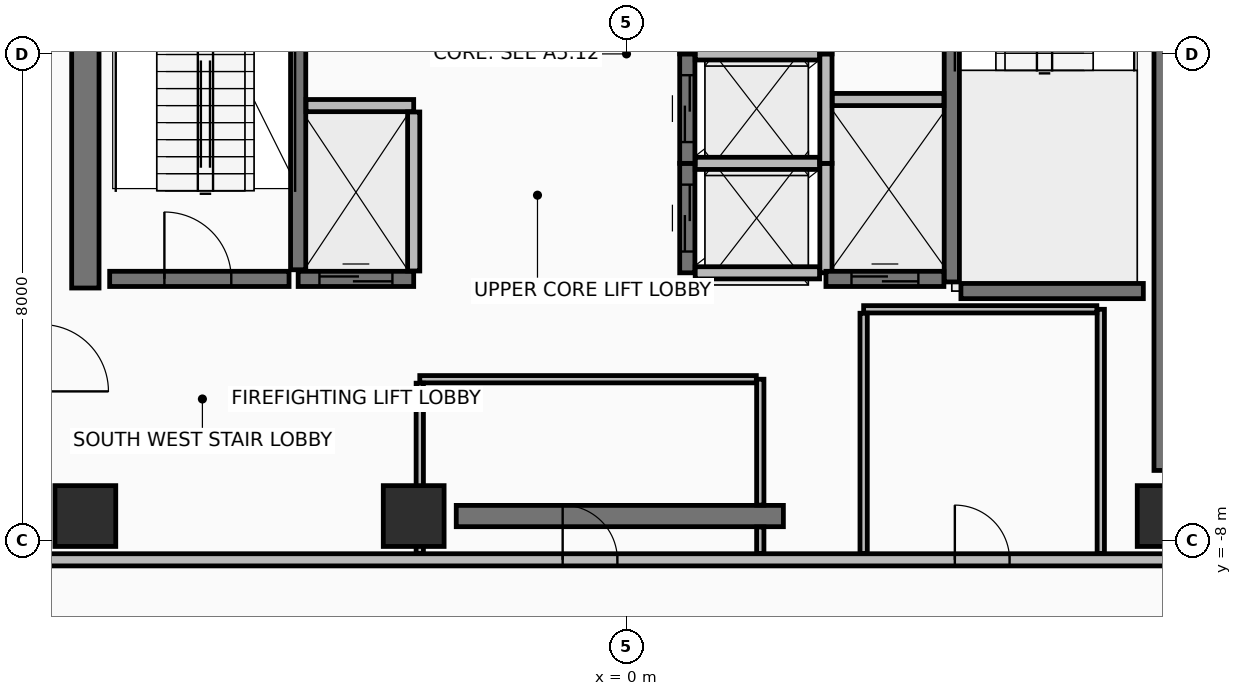
"""IFC4 building model, lengths in metres.
Left out: names, types, materials, properties, quantities, classifications, styles, units other than length and angle.
Written with IfcOpenShell. Run it as: python <this file> out.ifc"""

import sys

from ifc_helpers import new_model, si_unit, direction, frame, frame_2d, origin, origin_2d, place, context, subcontext, project, spatial, rectangle, extrude, element, fill, save


model = new_model("IFC4")
c1 = context("Model", 3, precision=1e-05, world=origin(), true_north=direction((0.0, 1.0)))
c2 = subcontext(c1, "Body", "Model", "MODEL_VIEW")
j1 = project(units=[si_unit("LENGTHUNIT", "METRE"), si_unit("PLANEANGLEUNIT", "RADIAN")], contexts=[c1])
p1 = place(None, origin())
s1 = spatial("IfcSite", under=j1, at=p1, CompositionType="ELEMENT")
p2 = place(p1, origin())
s2 = spatial("IfcBuilding", under=s1, at=p2, CompositionType="ELEMENT")
p3 = place(p2, frame((0.0, 0.0, 245.05)))
s3 = spatial("IfcBuildingStorey", under=s2, at=p3, CompositionType="ELEMENT", Elevation=245.05)
for number, where, z_axis, x_axis in (
    (1, (-8.9, -7.6, 0.0), (0.0, 0.0, 1.0), (1.0, 0.0, 0.0)),
    (2, (-3.5, -7.6, 0.0), (0.0, 0.0, 1.0), (1.0, 0.0, 0.0)),
    (3, (8.9, -7.6, 0.0), (0.0, 0.0, 1.0), (1.0, 0.0, 0.0)),
):
    element("IfcColumn", number, at=place(p3, frame(where, z_axis=z_axis, x_axis=x_axis)), inside=s3, PredefinedType="COLUMN", context=c2, shape_type="SweptSolid", body=[
        extrude(rectangle(XDim=1.0, YDim=1.0, at=origin_2d()), origin(), (0.0, 0.0, 1.0), 3.6),
    ])
p4 = place(p3, frame((-2.8, -7.6, 0.0), z_axis=(0.0, 0.0, 1.0), x_axis=(1.0, 0.0, 0.0)))
e4 = element("IfcWall", 4, at=p4, inside=s3, PredefinedType="SHEAR", context=c2, shape_type="SweptSolid", body=[
    extrude(rectangle(XDim=5.38, YDim=0.35, at=frame_2d((2.69, 0.0))), origin(), (0.0, 0.0, 1.0), 3.42),
])
for number, where, z_axis, x_axis in (
    (5, (-8.9, -3.85, 0.0), (0.0, 0.0, 1.0), (0.0, 1.0, 0.0)),
    (6, (8.9, -6.85, 0.0), (0.0, 0.0, 1.0), (0.0, 1.0, 0.0)),
):
    element("IfcWall", number, at=place(p3, frame(where, z_axis=z_axis, x_axis=x_axis)), inside=s3, PredefinedType="SHEAR", context=c2, shape_type="SweptSolid", body=[
        extrude(rectangle(XDim=10.7, YDim=0.45, at=frame_2d((5.35, 0.0))), origin(), (0.0, 0.0, 1.0), 3.42),
    ])
p5 = place(p3, frame((-9.62, -8.32, 0.0), z_axis=(0.0, 0.0, 1.0), x_axis=(1.0, 0.0, 0.0)))
e7 = element("IfcWall", 7, at=p5, inside=s3, PredefinedType="PARTITIONING", context=c2, shape_type="SweptSolid", body=[
    extrude(rectangle(XDim=19.24, YDim=0.2, at=frame_2d((9.62, 0.0))), origin(), (0.0, 0.0, 1.0), 2.915),
])
p6 = place(p5, frame((8.57, 0.0, 0.0)))
e8 = element("IfcOpeningElement", 8, at=p6, cuts=e7, PredefinedType="OPENING", context=c2, shape_type="SweptSolid", body=[
    extrude(rectangle(XDim=0.9, YDim=2.1, at=frame_2d((0.45, 1.05))), frame((0.0, 0.11, 0.0), z_axis=(0.0, -1.0, 0.0), x_axis=(1.0, 0.0, 0.0)), (0.0, 0.0, 1.0), 0.22),
])
p7 = place(p5, frame((15.02, 0.0, 0.0)))
e9 = element("IfcOpeningElement", 9, at=p7, cuts=e7, PredefinedType="OPENING", context=c2, shape_type="SweptSolid", body=[
    extrude(rectangle(XDim=0.9, YDim=2.1, at=frame_2d((0.45, 1.05))), frame((0.0, 0.11, 0.0), z_axis=(0.0, -1.0, 0.0), x_axis=(1.0, 0.0, 0.0)), (0.0, 0.0, 1.0), 0.22),
])
p8 = place(p3, frame((-5.4, -3.55, 0.0), z_axis=(0.0, 0.0, 1.0), x_axis=(0.0, 1.0, 0.0)))
e10 = element("IfcWall", 10, at=p8, inside=s3, PredefinedType="SHEAR", context=c2, shape_type="SweptSolid", body=[
    extrude(rectangle(XDim=7.3, YDim=0.25, at=frame_2d((3.65, 0.0))), origin(), (0.0, 0.0, 1.0), 3.42),
])
p9 = place(p3, frame((-8.5, -3.7, 0.0), z_axis=(0.0, 0.0, 1.0), x_axis=(1.0, 0.0, 0.0)))
e11 = element("IfcWall", 11, at=p9, inside=s3, PredefinedType="SHEAR", context=c2, shape_type="SweptSolid", body=[
    extrude(rectangle(XDim=2.95, YDim=0.25, at=frame_2d((1.475, 0.0))), origin(), (0.0, 0.0, 1.0), 3.42),
])
p10 = place(p9, frame((0.9, 0.0, 0.0)))
e12 = element("IfcOpeningElement", 12, at=p10, cuts=e11, PredefinedType="OPENING", context=c2, shape_type="SweptSolid", body=[
    extrude(rectangle(XDim=1.1, YDim=2.15, at=frame_2d((0.55, 1.075))), frame((0.0, 0.135, 0.0), z_axis=(0.0, -1.0, 0.0), x_axis=(1.0, 0.0, 0.0)), (0.0, 0.0, 1.0), 0.27),
])
p11 = place(p3, frame((5.35, -3.75, 0.0), z_axis=(0.0, 0.0, 1.0), x_axis=(0.0, 1.0, 0.0)))
e13 = element("IfcWall", 13, at=p11, inside=s3, PredefinedType="SHEAR", context=c2, shape_type="SweptSolid", body=[
    extrude(rectangle(XDim=7.3, YDim=0.25, at=frame_2d((3.65, 0.0))), origin(), (0.0, 0.0, 1.0), 3.42),
])
p12 = place(p3, frame((5.5, -3.9, 0.0), z_axis=(0.0, 0.0, 1.0), x_axis=(1.0, 0.0, 0.0)))
e14 = element("IfcWall", 14, at=p12, inside=s3, PredefinedType="SHEAR", context=c2, shape_type="SweptSolid", body=[
    extrude(rectangle(XDim=3.0, YDim=0.25, at=frame_2d((1.5, 0.0))), origin(), (0.0, 0.0, 1.0), 3.42),
])
p13 = place(p3, frame((1.0, -3.6, 0.0), z_axis=(0.0, 0.0, 1.0), x_axis=(0.0, 1.0, 0.0)))
e15 = element("IfcWall", 15, at=p13, inside=s3, PredefinedType="SHEAR", context=c2, shape_type="SweptSolid", body=[
    extrude(rectangle(XDim=1.8, YDim=0.25, at=frame_2d((0.9, 0.0))), origin(), (0.0, 0.0, 1.0), 3.42),
])
p14 = place(p13, frame((0.35, 0.0, 0.0)))
e16 = element("IfcOpeningElement", 16, at=p14, cuts=e15, PredefinedType="OPENING", context=c2, shape_type="SweptSolid", body=[
    extrude(rectangle(XDim=1.1, YDim=2.2, at=frame_2d((0.55, 1.1))), frame((0.0, 0.135, 0.0), z_axis=(0.0, -1.0, 0.0), x_axis=(1.0, 0.0, 0.0)), (0.0, 0.0, 1.0), 0.27),
])
p15 = place(p3, frame((3.28, -3.6, 0.0), z_axis=(0.0, 0.0, 1.0), x_axis=(0.0, 1.0, 0.0)))
e17 = element("IfcWall", 17, at=p15, inside=s3, PredefinedType="PARTITIONING", context=c2, shape_type="SweptSolid", body=[
    extrude(rectangle(XDim=1.8, YDim=0.2, at=frame_2d((0.9, 0.0))), origin(), (0.0, 0.0, 1.0), 3.42),
])
for number, where, z_axis, x_axis in (
    (18, (1.13, -3.6, 0.0), (0.0, 0.0, 1.0), (1.0, 0.0, 0.0)),
    (19, (1.13, -1.8, 0.0), (0.0, 0.0, 1.0), (1.0, 0.0, 0.0)),
):
    element("IfcWall", number, at=place(p3, frame(where, z_axis=z_axis, x_axis=x_axis)), inside=s3, PredefinedType="PARTITIONING", context=c2, shape_type="SweptSolid", body=[
        extrude(rectangle(XDim=2.045, YDim=0.2, at=frame_2d((1.022, 0.0))), origin(), (0.0, 0.0, 1.0), 3.42),
    ])
p16 = place(p3, frame((1.0, -1.8, 0.0), z_axis=(0.0, 0.0, 1.0), x_axis=(0.0, 1.0, 0.0)))
e20 = element("IfcWall", 20, at=p16, inside=s3, PredefinedType="SHEAR", context=c2, shape_type="SweptSolid", body=[
    extrude(rectangle(XDim=1.8, YDim=0.25, at=frame_2d((0.9, 0.0))), origin(), (0.0, 0.0, 1.0), 3.42),
])
p17 = place(p16, frame((0.35, 0.0, 0.0)))
e21 = element("IfcOpeningElement", 21, at=p17, cuts=e20, PredefinedType="OPENING", context=c2, shape_type="SweptSolid", body=[
    extrude(rectangle(XDim=1.1, YDim=2.2, at=frame_2d((0.55, 1.1))), frame((0.0, 0.135, 0.0), z_axis=(0.0, -1.0, 0.0), x_axis=(1.0, 0.0, 0.0)), (0.0, 0.0, 1.0), 0.27),
])
p18 = place(p3, frame((3.28, -1.8, 0.0), z_axis=(0.0, 0.0, 1.0), x_axis=(0.0, 1.0, 0.0)))
e22 = element("IfcWall", 22, at=p18, inside=s3, PredefinedType="PARTITIONING", context=c2, shape_type="SweptSolid", body=[
    extrude(rectangle(XDim=1.8, YDim=0.2, at=frame_2d((0.9, 0.0))), origin(), (0.0, 0.0, 1.0), 3.42),
])
p19 = place(p3, frame((1.13, 0.0, 0.0), z_axis=(0.0, 0.0, 1.0), x_axis=(1.0, 0.0, 0.0)))
e23 = element("IfcWall", 23, at=p19, inside=s3, PredefinedType="PARTITIONING", context=c2, shape_type="SweptSolid", body=[
    extrude(rectangle(XDim=2.045, YDim=0.2, at=frame_2d((1.022, 0.0))), origin(), (0.0, 0.0, 1.0), 3.42),
])
p20 = place(p3, frame((1.0, 0.0, 0.0), z_axis=(0.0, 0.0, 1.0), x_axis=(0.0, 1.0, 0.0)))
e24 = element("IfcWall", 24, at=p20, inside=s3, PredefinedType="SHEAR", context=c2, shape_type="SweptSolid", body=[
    extrude(rectangle(XDim=1.8, YDim=0.25, at=frame_2d((0.9, 0.0))), origin(), (0.0, 0.0, 1.0), 3.42),
])
p21 = place(p20, frame((0.35, 0.0, 0.0)))
e25 = element("IfcOpeningElement", 25, at=p21, cuts=e24, PredefinedType="OPENING", context=c2, shape_type="SweptSolid", body=[
    extrude(rectangle(XDim=1.1, YDim=2.2, at=frame_2d((0.55, 1.1))), frame((0.0, 0.135, 0.0), z_axis=(0.0, -1.0, 0.0), x_axis=(1.0, 0.0, 0.0)), (0.0, 0.0, 1.0), 0.27),
])
p22 = place(p3, frame((3.28, 0.0, 0.0), z_axis=(0.0, 0.0, 1.0), x_axis=(0.0, 1.0, 0.0)))
e26 = element("IfcWall", 26, at=p22, inside=s3, PredefinedType="PARTITIONING", context=c2, shape_type="SweptSolid", body=[
    extrude(rectangle(XDim=1.8, YDim=0.2, at=frame_2d((0.9, 0.0))), origin(), (0.0, 0.0, 1.0), 3.42),
])
p23 = place(p3, frame((-5.4, -3.7, 0.0), z_axis=(0.0, 0.0, 1.0), x_axis=(1.0, 0.0, 0.0)))
e27 = element("IfcWall", 27, at=p23, inside=s3, PredefinedType="SHEAR", context=c2, shape_type="SweptSolid", body=[
    extrude(rectangle(XDim=1.9, YDim=0.25, at=frame_2d((0.95, 0.0))), origin(), (0.0, 0.0, 1.0), 3.42),
])
p24 = place(p23, frame((0.35, 0.0, 0.0)))
e28 = element("IfcOpeningElement", 28, at=p24, cuts=e27, PredefinedType="OPENING", context=c2, shape_type="SweptSolid", body=[
    extrude(rectangle(XDim=1.2, YDim=2.2, at=frame_2d((0.6, 1.1))), frame((0.0, 0.135, 0.0), z_axis=(0.0, -1.0, 0.0), x_axis=(1.0, 0.0, 0.0)), (0.0, 0.0, 1.0), 0.27),
])
p25 = place(p3, frame((-5.27, -0.85, 0.0), z_axis=(0.0, 0.0, 1.0), x_axis=(1.0, 0.0, 0.0)))
e29 = element("IfcWall", 29, at=p25, inside=s3, PredefinedType="PARTITIONING", context=c2, shape_type="SweptSolid", body=[
    extrude(rectangle(XDim=1.77, YDim=0.2, at=frame_2d((0.885, 0.0))), origin(), (0.0, 0.0, 1.0), 3.42),
])
p26 = place(p3, frame((-3.5, -3.57, 0.0), z_axis=(0.0, 0.0, 1.0), x_axis=(0.0, 1.0, 0.0)))
e30 = element("IfcWall", 30, at=p26, inside=s3, PredefinedType="PARTITIONING", context=c2, shape_type="SweptSolid", body=[
    extrude(rectangle(XDim=2.615, YDim=0.2, at=frame_2d((1.308, 0.0))), origin(), (0.0, 0.0, 1.0), 3.42),
])
p27 = place(p3, frame((3.28, -3.7, 0.0), z_axis=(0.0, 0.0, 1.0), x_axis=(1.0, 0.0, 0.0)))
e31 = element("IfcWall", 31, at=p27, inside=s3, PredefinedType="SHEAR", context=c2, shape_type="SweptSolid", body=[
    extrude(rectangle(XDim=1.94, YDim=0.25, at=frame_2d((0.97, 0.0))), origin(), (0.0, 0.0, 1.0), 3.42),
])
p28 = place(p27, frame((0.42, 0.0, 0.0)))
e32 = element("IfcOpeningElement", 32, at=p28, cuts=e31, PredefinedType="OPENING", context=c2, shape_type="SweptSolid", body=[
    extrude(rectangle(XDim=1.1, YDim=2.2, at=frame_2d((0.55, 1.1))), frame((0.0, 0.135, 0.0), z_axis=(0.0, -1.0, 0.0), x_axis=(1.0, 0.0, 0.0)), (0.0, 0.0, 1.0), 0.27),
])
p29 = place(p3, frame((3.385, -0.75, 0.0), z_axis=(0.0, 0.0, 1.0), x_axis=(1.0, 0.0, 0.0)))
e33 = element("IfcWall", 33, at=p29, inside=s3, PredefinedType="PARTITIONING", context=c2, shape_type="SweptSolid", body=[
    extrude(rectangle(XDim=1.835, YDim=0.2, at=frame_2d((0.917, 0.0))), origin(), (0.0, 0.0, 1.0), 3.42),
])
p30 = place(p3, frame((2.2, -8.215, 0.0), z_axis=(0.0, 0.0, 1.0), x_axis=(0.0, 1.0, 0.0)))
e34 = element("IfcWall", 34, at=p30, inside=s3, PredefinedType="PARTITIONING", context=c2, shape_type="SweptSolid", body=[
    extrude(rectangle(XDim=0.435, YDim=0.12, at=frame_2d((0.218, 0.0))), origin(), (0.0, 0.0, 1.0), 2.715),
])
p31 = place(p3, frame((2.2, -7.42, 0.0), z_axis=(0.0, 0.0, 1.0), x_axis=(0.0, 1.0, 0.0)))
e35 = element("IfcWall", 35, at=p31, inside=s3, PredefinedType="PARTITIONING", context=c2, shape_type="SweptSolid", body=[
    extrude(rectangle(XDim=2.07, YDim=0.12, at=frame_2d((1.035, 0.0))), origin(), (0.0, 0.0, 1.0), 2.715),
])
p32 = place(p3, frame((2.135, -5.35, 0.0), z_axis=(0.0, 0.0, 1.0), x_axis=(-1.0, 0.0, 0.0)))
e36 = element("IfcWall", 36, at=p32, inside=s3, PredefinedType="PARTITIONING", context=c2, shape_type="SweptSolid", body=[
    extrude(rectangle(XDim=5.535, YDim=0.12, at=frame_2d((2.768, 0.0))), origin(), (0.0, 0.0, 1.0), 2.715),
])
p33 = place(p3, frame((-3.4, -5.415, 0.0), z_axis=(0.0, 0.0, 1.0), x_axis=(0.0, -1.0, 0.0)))
e37 = element("IfcWall", 37, at=p33, inside=s3, PredefinedType="PARTITIONING", context=c2, shape_type="SweptSolid", body=[
    extrude(rectangle(XDim=2.8, YDim=0.12, at=frame_2d((1.4, 0.0))), origin(), (0.0, 0.0, 1.0), 2.715),
])
p34 = place(p3, frame((7.8, -8.215, 0.0), z_axis=(0.0, 0.0, 1.0), x_axis=(0.0, 1.0, 0.0)))
e38 = element("IfcWall", 38, at=p34, inside=s3, PredefinedType="PARTITIONING", context=c2, shape_type="SweptSolid", body=[
    extrude(rectangle(XDim=4.015, YDim=0.12, at=frame_2d((2.008, 0.0))), origin(), (0.0, 0.0, 1.0), 2.715),
])
p35 = place(p3, frame((7.735, -4.2, 0.0), z_axis=(0.0, 0.0, 1.0), x_axis=(-1.0, 0.0, 0.0)))
e39 = element("IfcWall", 39, at=p35, inside=s3, PredefinedType="PARTITIONING", context=c2, shape_type="SweptSolid", body=[
    extrude(rectangle(XDim=3.835, YDim=0.12, at=frame_2d((1.917, 0.0))), origin(), (0.0, 0.0, 1.0), 3.42),
])
p36 = place(p3, frame((3.9, -4.265, 0.0), z_axis=(0.0, 0.0, 1.0), x_axis=(0.0, -1.0, 0.0)))
e40 = element("IfcWall", 40, at=p36, inside=s3, PredefinedType="PARTITIONING", context=c2, shape_type="SweptSolid", body=[
    extrude(rectangle(XDim=3.95, YDim=0.12, at=frame_2d((1.975, 0.0))), origin(), (0.0, 0.0, 1.0), 2.715),
])
p37 = place(p10, origin())
e41 = element("IfcDoor", 41, at=p37, inside=s3, OperationType="SINGLE_SWING_LEFT", PredefinedType="DOOR", context=c2, shape_type="SweptSolid", body=[
    extrude(rectangle(XDim=1.1, YDim=2.15, at=frame_2d((0.55, 1.075))), frame((0.0, 0.025, 0.0), z_axis=(0.0, -1.0, 0.0), x_axis=(1.0, 0.0, 0.0)), (0.0, 0.0, 1.0), 0.05),
])
fill(e12, e41)
p38 = place(p14, origin())
e42 = element("IfcDoor", 42, at=p38, inside=s3, OperationType="SLIDING_TO_LEFT", PredefinedType="DOOR", context=c2, shape_type="SweptSolid", body=[
    extrude(rectangle(XDim=1.1, YDim=2.2, at=frame_2d((0.55, 1.1))), frame((0.0, 0.025, 0.0), z_axis=(0.0, -1.0, 0.0), x_axis=(1.0, 0.0, 0.0)), (0.0, 0.0, 1.0), 0.05),
])
fill(e16, e42)
p39 = place(p17, origin())
e43 = element("IfcDoor", 43, at=p39, inside=s3, OperationType="SLIDING_TO_LEFT", PredefinedType="DOOR", context=c2, shape_type="SweptSolid", body=[
    extrude(rectangle(XDim=1.1, YDim=2.2, at=frame_2d((0.55, 1.1))), frame((0.0, 0.025, 0.0), z_axis=(0.0, -1.0, 0.0), x_axis=(1.0, 0.0, 0.0)), (0.0, 0.0, 1.0), 0.05),
])
fill(e21, e43)
p40 = place(p24, origin())
e44 = element("IfcDoor", 44, at=p40, inside=s3, OperationType="SLIDING_TO_RIGHT", PredefinedType="DOOR", context=c2, shape_type="SweptSolid", body=[
    extrude(rectangle(XDim=1.2, YDim=2.2, at=frame_2d((0.6, 1.1))), frame((0.0, 0.025, 0.0), z_axis=(0.0, -1.0, 0.0), x_axis=(1.0, 0.0, 0.0)), (0.0, 0.0, 1.0), 0.05),
])
fill(e28, e44)
p41 = place(p28, origin())
e45 = element("IfcDoor", 45, at=p41, inside=s3, OperationType="SLIDING_TO_LEFT", PredefinedType="DOOR", context=c2, shape_type="SweptSolid", body=[
    extrude(rectangle(XDim=1.1, YDim=2.2, at=frame_2d((0.55, 1.1))), frame((0.0, 0.025, 0.0), z_axis=(0.0, -1.0, 0.0), x_axis=(1.0, 0.0, 0.0)), (0.0, 0.0, 1.0), 0.05),
])
fill(e32, e45)
p42 = place(p6, origin())
e46 = element("IfcDoor", 46, at=p42, inside=s3, OperationType="SINGLE_SWING_LEFT", PredefinedType="DOOR", context=c2, shape_type="SweptSolid", body=[
    extrude(rectangle(XDim=0.9, YDim=2.1, at=frame_2d((0.45, 1.05))), frame((0.0, 0.025, 0.0), z_axis=(0.0, -1.0, 0.0), x_axis=(1.0, 0.0, 0.0)), (0.0, 0.0, 1.0), 0.05),
])
fill(e8, e46)
p43 = place(p7, origin())
e47 = element("IfcDoor", 47, at=p43, inside=s3, OperationType="SINGLE_SWING_LEFT", PredefinedType="DOOR", context=c2, shape_type="SweptSolid", body=[
    extrude(rectangle(XDim=0.9, YDim=2.1, at=frame_2d((0.45, 1.05))), frame((0.0, 0.025, 0.0), z_axis=(0.0, -1.0, 0.0), x_axis=(1.0, 0.0, 0.0)), (0.0, 0.0, 1.0), 0.05),
])
fill(e9, e47)
save(model, sys.argv[1])
